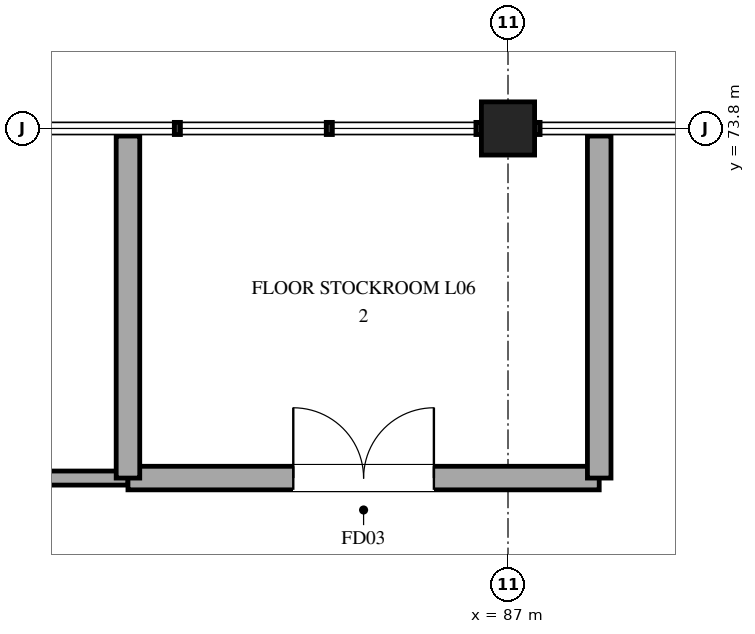
"""IFC4 building model, lengths in metres.
Left out: names, types, materials, properties, quantities, classifications, styles, units other than length and angle.
Written with IfcOpenShell. Run it as: python <this file> out.ifc"""

import sys

from ifc_helpers import new_model, si_unit, direction, frame, frame_2d, origin, origin_2d, place, context, subcontext, project, spatial, rectangle, extrude, element, fill, save


model = new_model("IFC4")
c1 = context("Model", 3, precision=1e-05, world=origin(), true_north=direction((0.0, 1.0)))
c2 = subcontext(c1, "Body", "Model", "MODEL_VIEW")
j1 = project(units=[si_unit("LENGTHUNIT", "METRE"), si_unit("PLANEANGLEUNIT", "RADIAN")], contexts=[c1])
p1 = place(None, origin())
s1 = spatial("IfcSite", under=j1, at=p1, CompositionType="ELEMENT")
p2 = place(p1, origin())
s2 = spatial("IfcBuilding", under=s1, at=p2, CompositionType="ELEMENT")
p3 = place(p2, frame((0.0, 0.0, 26.7)))
s3 = spatial("IfcBuildingStorey", under=s2, at=p3, CompositionType="ELEMENT", Elevation=26.7)
p4 = place(p3, frame((87.0, 73.8, 0.0), z_axis=(0.0, 0.0, 1.0), x_axis=(1.0, 0.0, 0.0)))
e1 = element("IfcColumn", 1, at=p4, inside=s3, PredefinedType="COLUMN", context=c2, shape_type="SweptSolid", body=[
    extrude(rectangle(XDim=0.7, YDim=0.7, at=origin_2d()), origin(), (0.0, 0.0, 1.0), 4.8),
])
p5 = place(p3, frame((52.2, 69.2, 0.0), z_axis=(0.0, 0.0, 1.0), x_axis=(1.0, 0.0, 0.0)))
e2 = element("IfcWall", 2, at=p5, inside=s3, PredefinedType="PARTITIONING", context=c2, shape_type="SweptSolid", body=[
    extrude(rectangle(XDim=29.8, YDim=0.185, at=frame_2d((14.9, 0.0))), origin(), (0.0, 0.0, 1.0), 3.76),
])
p6 = place(p5, frame((14.225, 0.0, 0.0)))
e3 = element("IfcOpeningElement", 3, at=p6, cuts=e2, PredefinedType="OPENING", context=c2, shape_type="SweptSolid", body=[
    extrude(rectangle(XDim=1.35, YDim=2.2, at=frame_2d((0.675, 1.1))), frame((0.0, 0.103, 0.0), z_axis=(0.0, -1.0, 0.0), x_axis=(1.0, 0.0, 0.0)), (0.0, 0.0, 1.0), 0.205),
])
p7 = place(p3, frame((82.0, 69.2, 0.0), z_axis=(0.0, 0.0, 1.0), x_axis=(1.0, 0.0, 0.0)))
e4 = element("IfcWall", 4, at=p7, inside=s3, PredefinedType="STANDARD", context=c2, shape_type="SweptSolid", body=[
    extrude(rectangle(XDim=6.2, YDim=0.31, at=frame_2d((3.1, 0.0))), origin(), (0.0, 0.0, 1.0), 3.76),
])
p8 = place(p7, frame((2.175, 0.0, 0.0)))
e5 = element("IfcOpeningElement", 5, at=p8, cuts=e4, PredefinedType="OPENING", context=c2, shape_type="SweptSolid", body=[
    extrude(rectangle(XDim=1.85, YDim=2.3, at=frame_2d((0.925, 1.15))), frame((0.0, 0.165, 0.0), z_axis=(0.0, -1.0, 0.0), x_axis=(1.0, 0.0, 0.0)), (0.0, 0.0, 1.0), 0.33),
])
for number, where, z_axis, x_axis in (
    (6, (88.2, 69.2, 0.0), (0.0, 0.0, 1.0), (0.0, 1.0, 0.0)),
    (7, (82.0, 73.7, 0.0), (0.0, 0.0, 1.0), (0.0, -1.0, 0.0)),
):
    element("IfcWall", number, at=place(p3, frame(where, z_axis=z_axis, x_axis=x_axis)), inside=s3, PredefinedType="STANDARD", context=c2, shape_type="SweptSolid", body=[
        extrude(rectangle(XDim=4.5, YDim=0.31, at=frame_2d((2.25, 0.0))), origin(), (0.0, 0.0, 1.0), 3.96),
    ])
p9 = place(p8, origin())
e8 = element("IfcDoor", 8, at=p9, inside=s3, OperationType="DOUBLE_DOOR_SINGLE_SWING", PredefinedType="DOOR", context=c2, shape_type="SweptSolid", body=[
    extrude(rectangle(XDim=1.85, YDim=2.3, at=frame_2d((0.925, 1.15))), frame((0.0, 0.025, 0.0), z_axis=(0.0, -1.0, 0.0), x_axis=(1.0, 0.0, 0.0)), (0.0, 0.0, 1.0), 0.05),
])
fill(e5, e8)
save(model, sys.argv[1])
